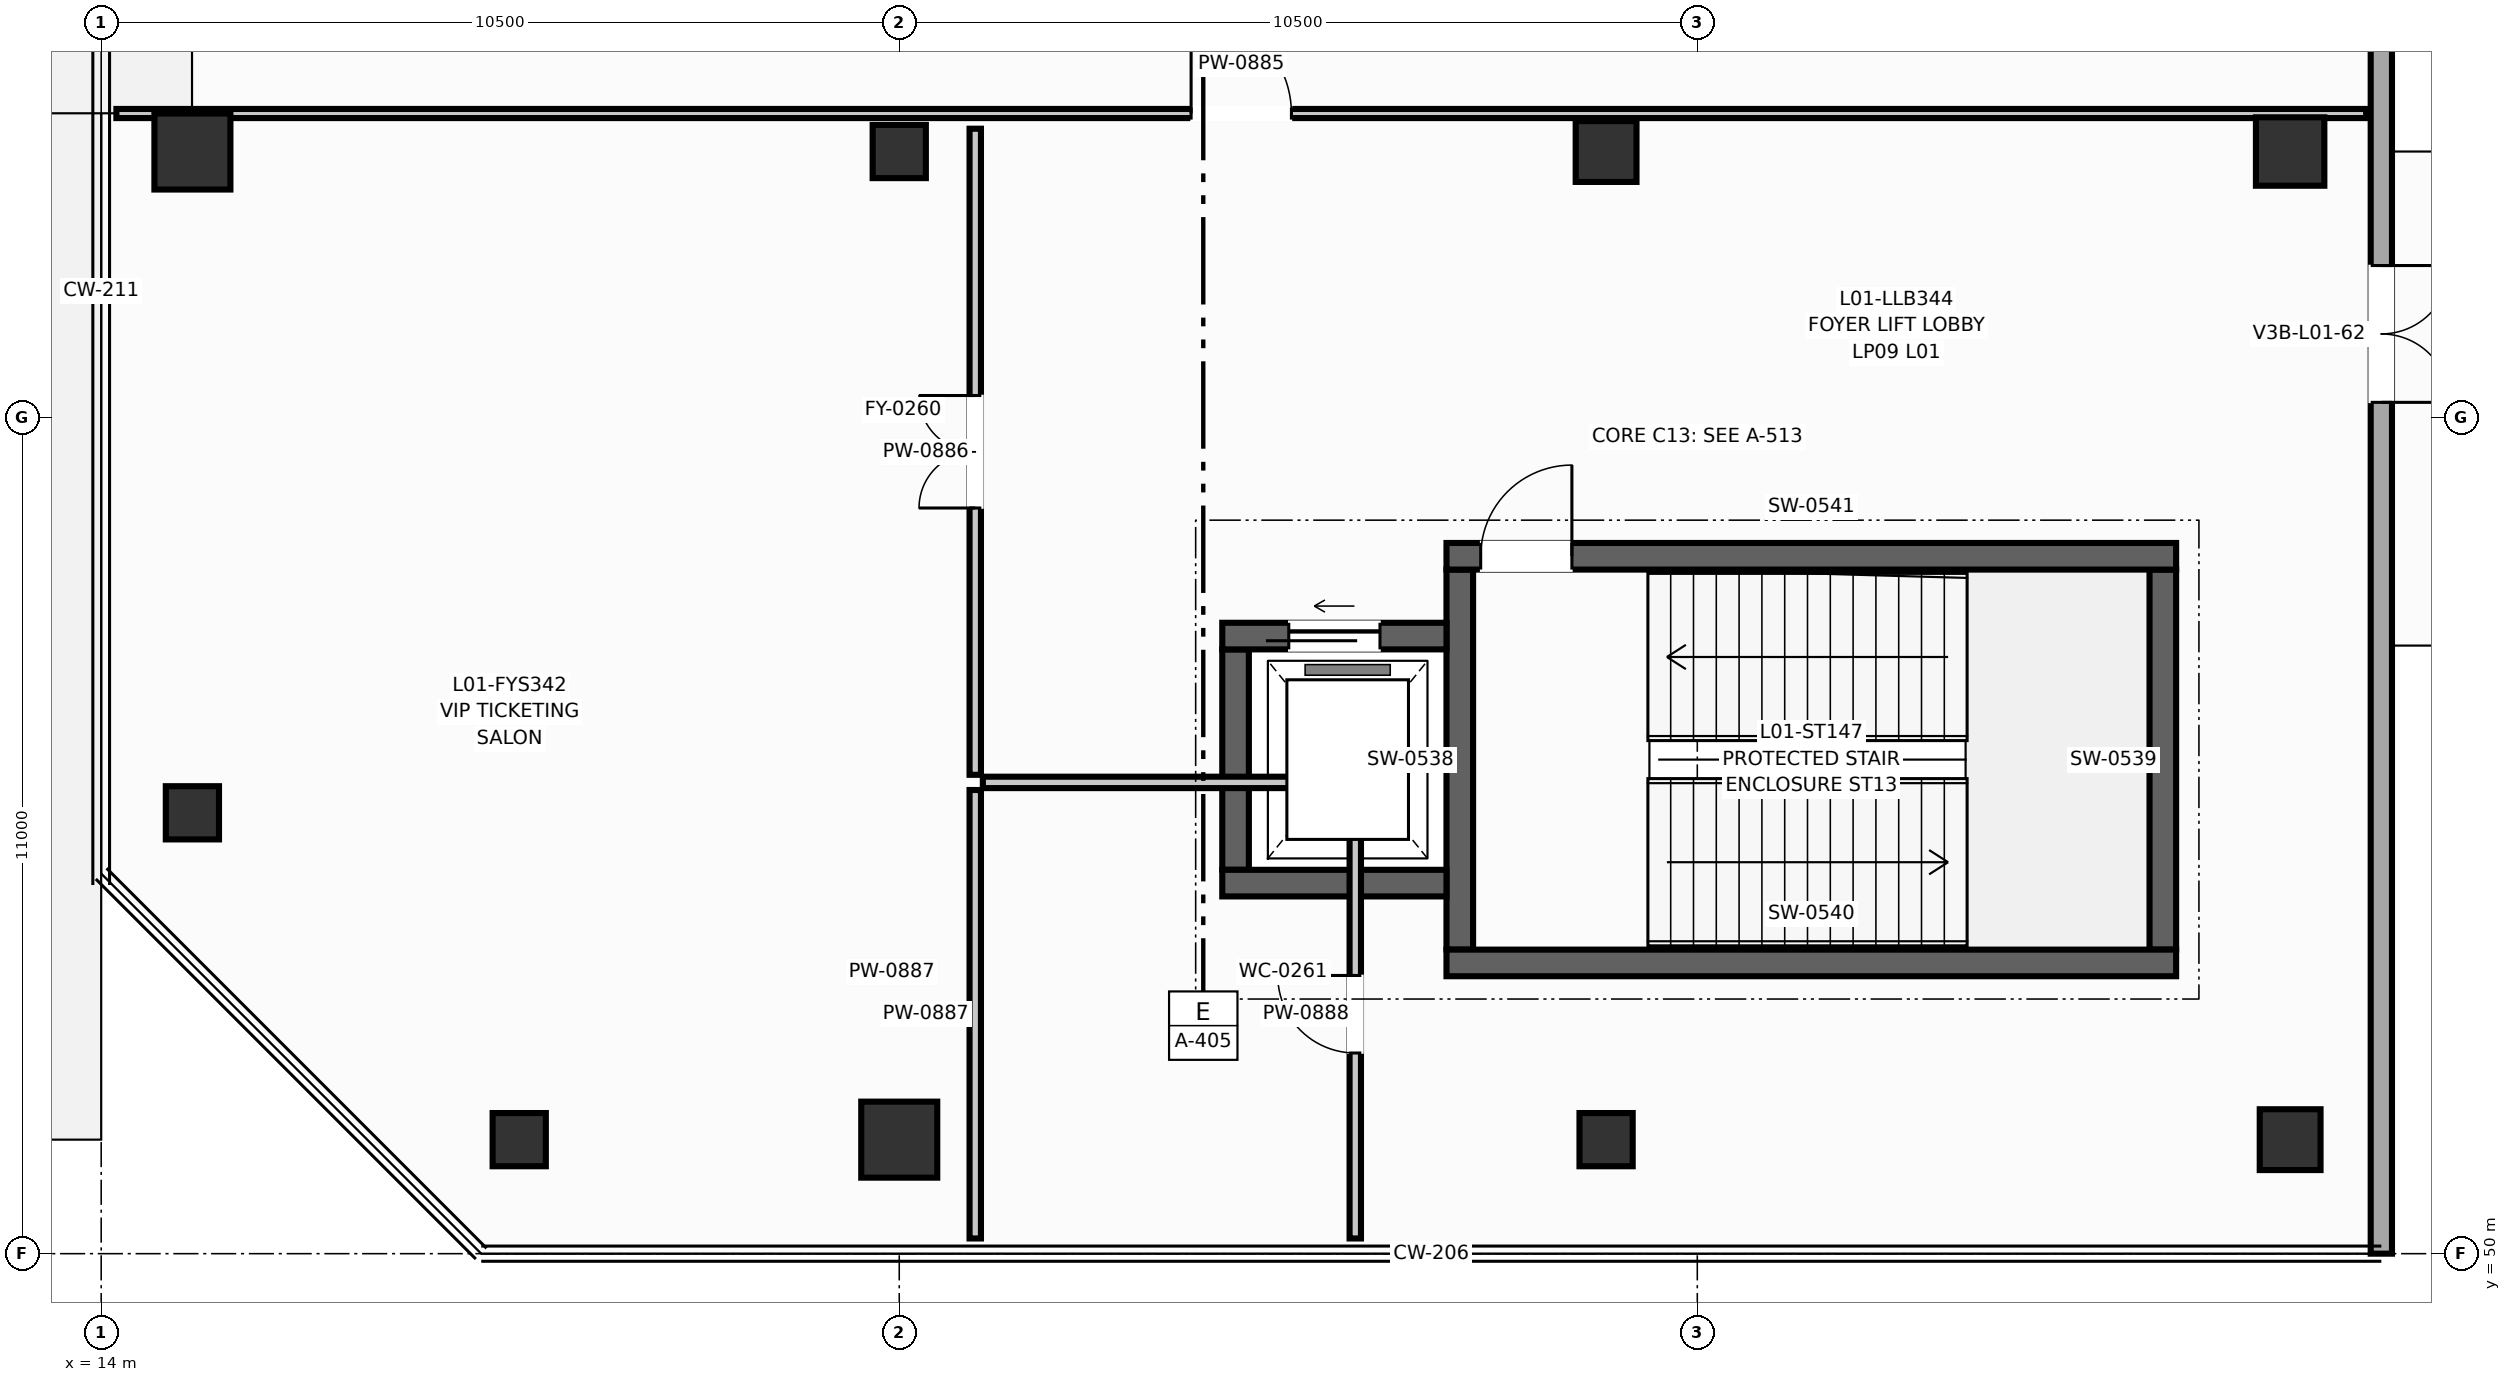
"""IFC4 building model, lengths in metres.
Left out: names, types, materials, properties, quantities, classifications, styles, units other than length and angle.
Written with IfcOpenShell. Run it as: python <this file> out.ifc"""

import sys

from ifc_helpers import new_model, si_unit, direction, frame, frame_2d, origin, origin_2d, place, context, subcontext, project, spatial, rectangle, circle, extrude, element, fill, save


model = new_model("IFC4")
c1 = context("Model", 3, precision=1e-05, world=origin(), true_north=direction((0.0, 1.0)))
c2 = subcontext(c1, "Body", "Model", "MODEL_VIEW")
j1 = project(units=[si_unit("LENGTHUNIT", "METRE"), si_unit("PLANEANGLEUNIT", "RADIAN")], contexts=[c1])
p1 = place(None, origin())
s1 = spatial("IfcSite", under=j1, at=p1, CompositionType="ELEMENT")
p2 = place(p1, origin())
s2 = spatial("IfcBuilding", under=s1, at=p2, CompositionType="ELEMENT")
p3 = place(p2, frame((0.0, 0.0, 4.5)))
s3 = spatial("IfcBuildingStorey", under=s2, at=p3, CompositionType="ELEMENT", Elevation=4.5)
for number, where, z_axis, x_axis in (
    (1, (15.2, 64.5, 0.0), (0.0, 0.0, 1.0), (1.0, 0.0, 0.0)),
    (2, (24.5, 51.5, 0.0), (0.0, 0.0, 1.0), (1.0, 0.0, 0.0)),
):
    element("IfcColumn", number, at=place(p3, frame(where, z_axis=z_axis, x_axis=x_axis)), inside=s3, PredefinedType="COLUMN", context=c2, shape_type="SweptSolid", body=[
        extrude(circle(Radius=0.5, at=origin_2d()), origin(), (0.0, 0.0, 1.0), 4.5),
    ])
for number, where, z_axis, x_axis in (
    (3, (24.5, 64.5, 0.0), (0.0, 0.0, 1.0), (1.0, 0.0, 0.0)),
    (4, (33.8, 51.5, 0.0), (0.0, 0.0, 1.0), (1.0, 0.0, 0.0)),
):
    element("IfcColumn", number, at=place(p3, frame(where, z_axis=z_axis, x_axis=x_axis)), inside=s3, PredefinedType="COLUMN", context=c2, shape_type="SweptSolid", body=[
        extrude(circle(Radius=0.35, at=origin_2d()), origin(), (0.0, 0.0, 1.0), 4.5),
    ])
for number, where, z_axis, x_axis in (
    (5, (33.8, 64.5, 0.0), (0.0, 0.0, 1.0), (1.0, 0.0, 0.0)),
    (6, (42.8, 51.5, 0.0), (0.0, 0.0, 1.0), (1.0, 0.0, 0.0)),
):
    element("IfcColumn", number, at=place(p3, frame(where, z_axis=z_axis, x_axis=x_axis)), inside=s3, PredefinedType="COLUMN", context=c2, shape_type="SweptSolid", body=[
        extrude(circle(Radius=0.4, at=origin_2d()), origin(), (0.0, 0.0, 1.0), 4.5),
    ])
p4 = place(p3, frame((42.8, 64.5, 0.0), z_axis=(0.0, 0.0, 1.0), x_axis=(1.0, 0.0, 0.0)))
e7 = element("IfcColumn", 7, at=p4, inside=s3, PredefinedType="COLUMN", context=c2, shape_type="SweptSolid", body=[
    extrude(circle(Radius=0.45, at=origin_2d()), origin(), (0.0, 0.0, 1.0), 4.5),
])
for number, where, z_axis, x_axis in (
    (8, (19.5, 51.5, 0.0), (0.0, 0.0, 1.0), (1.0, 0.0, 0.0)),
    (9, (15.2, 55.8, 0.0), (0.0, 0.0, 1.0), (1.0, 0.0, 0.0)),
):
    element("IfcColumn", number, at=place(p3, frame(where, z_axis=z_axis, x_axis=x_axis)), inside=s3, PredefinedType="COLUMN", context=c2, shape_type="SweptSolid", body=[
        extrude(circle(Radius=0.35, at=origin_2d()), origin(), (0.0, 0.0, 1.0), 4.5),
    ])
p5 = place(p3, frame((44.0, 50.0, 0.0), z_axis=(0.0, 0.0, 1.0), x_axis=(0.0, 1.0, 0.0)))
e10 = element("IfcWall", 10, at=p5, inside=s3, PredefinedType="SOLIDWALL", context=c2, shape_type="SweptSolid", body=[
    extrude(rectangle(XDim=56.0, YDim=0.28, at=frame_2d((28.0, 0.0))), origin(), (0.0, 0.0, 1.0), 3.55),
])
p6 = place(p5, frame((11.2, 0.0, 0.0)))
e11 = element("IfcOpeningElement", 11, at=p6, cuts=e10, PredefinedType="OPENING", context=c2, shape_type="SweptSolid", body=[
    extrude(rectangle(XDim=1.8, YDim=2.35, at=frame_2d((0.9, 1.175))), frame((0.0, 0.15, 0.0), z_axis=(0.0, -1.0, 0.0), x_axis=(1.0, 0.0, 0.0)), (0.0, 0.0, 1.0), 0.3),
])
p7 = place(p5, frame((43.0, 0.0, 0.0)))
e12 = element("IfcOpeningElement", 12, at=p7, cuts=e10, PredefinedType="OPENING", context=c2, shape_type="SweptSolid", body=[
    extrude(rectangle(XDim=1.8, YDim=2.35, at=frame_2d((0.9, 1.175))), frame((0.0, 0.15, 0.0), z_axis=(0.0, -1.0, 0.0), x_axis=(1.0, 0.0, 0.0)), (0.0, 0.0, 1.0), 0.3),
])
for number, where, z_axis, x_axis in (
    (13, (31.875, 54.0, 0.0), (0.0, 0.0, 1.0), (0.0, 1.0, 0.0)),
    (14, (41.125, 54.0, 0.0), (0.0, 0.0, 1.0), (0.0, 1.0, 0.0)),
):
    element("IfcWall", number, at=place(p3, frame(where, z_axis=z_axis, x_axis=x_axis)), inside=s3, PredefinedType="SHEAR", context=c2, shape_type="SweptSolid", body=[
        extrude(rectangle(XDim=5.0, YDim=0.35, at=frame_2d((2.5, 0.0))), origin(), (0.0, 0.0, 1.0), 4.29),
    ])
p8 = place(p3, frame((31.7, 53.825, 0.0), z_axis=(0.0, 0.0, 1.0), x_axis=(1.0, 0.0, 0.0)))
e15 = element("IfcWall", 15, at=p8, inside=s3, PredefinedType="SHEAR", context=c2, shape_type="SweptSolid", body=[
    extrude(rectangle(XDim=9.6, YDim=0.35, at=frame_2d((4.8, 0.0))), origin(), (0.0, 0.0, 1.0), 4.29),
])
p9 = place(p3, frame((31.7, 59.175, 0.0), z_axis=(0.0, 0.0, 1.0), x_axis=(1.0, 0.0, 0.0)))
e16 = element("IfcWall", 16, at=p9, inside=s3, PredefinedType="SHEAR", context=c2, shape_type="SweptSolid", body=[
    extrude(rectangle(XDim=9.6, YDim=0.35, at=frame_2d((4.8, 0.0))), origin(), (0.0, 0.0, 1.0), 4.29),
])
p10 = place(p9, frame((0.45, 0.0, 0.0)))
e17 = element("IfcOpeningElement", 17, at=p10, cuts=e16, PredefinedType="OPENING", context=c2, shape_type="SweptSolid", body=[
    extrude(rectangle(XDim=1.2, YDim=2.2, at=frame_2d((0.6, 1.1))), frame((0.0, 0.185, 0.0), z_axis=(0.0, -1.0, 0.0), x_axis=(1.0, 0.0, 0.0)), (0.0, 0.0, 1.0), 0.37),
])
p11 = place(p3, frame((28.925, 55.05, 0.0), z_axis=(0.0, 0.0, 1.0), x_axis=(0.0, 1.0, 0.0)))
e18 = element("IfcWall", 18, at=p11, inside=s3, PredefinedType="SHEAR", context=c2, shape_type="SweptSolid", body=[
    extrude(rectangle(XDim=2.9, YDim=0.35, at=frame_2d((1.45, 0.0))), origin(), (0.0, 0.0, 1.0), 4.29),
])
p12 = place(p3, frame((28.75, 54.875, 0.0), z_axis=(0.0, 0.0, 1.0), x_axis=(1.0, 0.0, 0.0)))
e19 = element("IfcWall", 19, at=p12, inside=s3, PredefinedType="SHEAR", context=c2, shape_type="SweptSolid", body=[
    extrude(rectangle(XDim=2.95, YDim=0.35, at=frame_2d((1.475, 0.0))), origin(), (0.0, 0.0, 1.0), 4.29),
])
p13 = place(p3, frame((28.75, 58.125, 0.0), z_axis=(0.0, 0.0, 1.0), x_axis=(1.0, 0.0, 0.0)))
e20 = element("IfcWall", 20, at=p13, inside=s3, PredefinedType="SHEAR", context=c2, shape_type="SweptSolid", body=[
    extrude(rectangle(XDim=2.95, YDim=0.35, at=frame_2d((1.475, 0.0))), origin(), (0.0, 0.0, 1.0), 4.29),
])
p14 = place(p13, frame((0.875, 0.0, 0.0)))
e21 = element("IfcOpeningElement", 21, at=p14, cuts=e20, PredefinedType="OPENING", context=c2, shape_type="SweptSolid", body=[
    extrude(rectangle(XDim=1.2, YDim=2.2, at=frame_2d((0.6, 1.1))), frame((0.0, 0.185, 0.0), z_axis=(0.0, -1.0, 0.0), x_axis=(1.0, 0.0, 0.0)), (0.0, 0.0, 1.0), 0.37),
])
p15 = place(p3, frame((14.2, 65.0, 0.0), z_axis=(0.0, 0.0, 1.0), x_axis=(1.0, 0.0, 0.0)))
e22 = element("IfcWall", 22, at=p15, inside=s3, PredefinedType="PARTITIONING", context=c2, shape_type="SweptSolid", body=[
    extrude(rectangle(XDim=29.6, YDim=0.12, at=frame_2d((14.8, 0.0))), origin(), (0.0, 0.0, 1.0), 3.22),
])
p16 = place(p15, frame((14.14, 0.0, 0.0)))
e23 = element("IfcOpeningElement", 23, at=p16, cuts=e22, PredefinedType="OPENING", context=c2, shape_type="SweptSolid", body=[
    extrude(rectangle(XDim=1.32, YDim=2.22, at=frame_2d((0.66, 1.11))), frame((0.0, 0.07, 0.0), z_axis=(0.0, -1.0, 0.0), x_axis=(1.0, 0.0, 0.0)), (0.0, 0.0, 1.0), 0.14),
])
p17 = place(p3, frame((25.5, 56.3, 0.0), z_axis=(0.0, 0.0, 1.0), x_axis=(0.0, 1.0, 0.0)))
e24 = element("IfcWall", 24, at=p17, inside=s3, PredefinedType="PARTITIONING", context=c2, shape_type="SweptSolid", body=[
    extrude(rectangle(XDim=8.5, YDim=0.15, at=frame_2d((4.25, 0.0))), origin(), (0.0, 0.0, 1.0), 3.22),
])
p18 = place(p17, frame((3.51, 0.0, 0.0)))
e25 = element("IfcOpeningElement", 25, at=p18, cuts=e24, PredefinedType="OPENING", context=c2, shape_type="SweptSolid", body=[
    extrude(rectangle(XDim=1.48, YDim=2.24, at=frame_2d((0.74, 1.12))), frame((0.0, 0.085, 0.0), z_axis=(0.0, -1.0, 0.0), x_axis=(1.0, 0.0, 0.0)), (0.0, 0.0, 1.0), 0.17),
])
p19 = place(p3, frame((25.5, 50.2, 0.0), z_axis=(0.0, 0.0, 1.0), x_axis=(0.0, 1.0, 0.0)))
e26 = element("IfcWall", 26, at=p19, inside=s3, PredefinedType="PARTITIONING", context=c2, shape_type="SweptSolid", body=[
    extrude(rectangle(XDim=5.9, YDim=0.15, at=frame_2d((2.95, 0.0))), origin(), (0.0, 0.0, 1.0), 3.22),
])
p20 = place(p3, frame((30.5, 50.2, 0.0), z_axis=(0.0, 0.0, 1.0), x_axis=(0.0, 1.0, 0.0)))
e27 = element("IfcWall", 27, at=p20, inside=s3, PredefinedType="PARTITIONING", context=c2, shape_type="SweptSolid", body=[
    extrude(rectangle(XDim=5.9, YDim=0.15, at=frame_2d((2.95, 0.0))), origin(), (0.0, 0.0, 1.0), 3.22),
])
p21 = place(p20, frame((2.44, 0.0, 0.0)))
e28 = element("IfcOpeningElement", 28, at=p21, cuts=e27, PredefinedType="OPENING", context=c2, shape_type="SweptSolid", body=[
    extrude(rectangle(XDim=1.02, YDim=2.15, at=frame_2d((0.51, 1.075))), frame((0.0, 0.085, 0.0), z_axis=(0.0, -1.0, 0.0), x_axis=(1.0, 0.0, 0.0)), (0.0, 0.0, 1.0), 0.17),
])
p22 = place(p3, frame((25.6, 56.2, 0.0), z_axis=(0.0, 0.0, 1.0), x_axis=(1.0, 0.0, 0.0)))
e29 = element("IfcWall", 29, at=p22, inside=s3, PredefinedType="PARTITIONING", context=c2, shape_type="SweptSolid", body=[
    extrude(rectangle(XDim=4.8, YDim=0.15, at=frame_2d((2.4, 0.0))), origin(), (0.0, 0.0, 1.0), 3.22),
])
p23 = place(p6, frame((1.8, 0.0, 0.0), z_axis=(0.0, 0.0, 1.0), x_axis=(-1.0, 0.0, 0.0)))
e30 = element("IfcDoor", 30, at=p23, inside=s3, OperationType="DOUBLE_DOOR_SINGLE_SWING", PredefinedType="DOOR", context=c2, shape_type="SweptSolid", body=[
    extrude(rectangle(XDim=1.8, YDim=2.35, at=frame_2d((0.9, 1.175))), frame((0.0, 0.025, 0.0), z_axis=(0.0, -1.0, 0.0), x_axis=(1.0, 0.0, 0.0)), (0.0, 0.0, 1.0), 0.05),
])
fill(e11, e30)
p24 = place(p10, origin())
e31 = element("IfcDoor", 31, at=p24, inside=s3, OperationType="SINGLE_SWING_RIGHT", PredefinedType="DOOR", context=c2, shape_type="SweptSolid", body=[
    extrude(rectangle(XDim=1.2, YDim=2.2, at=frame_2d((0.6, 1.1))), frame((0.0, 0.025, 0.0), z_axis=(0.0, -1.0, 0.0), x_axis=(1.0, 0.0, 0.0)), (0.0, 0.0, 1.0), 0.05),
])
fill(e17, e31)
p25 = place(p14, origin())
e32 = element("IfcDoor", 32, at=p25, inside=s3, OperationType="SLIDING_TO_LEFT", PredefinedType="DOOR", context=c2, shape_type="SweptSolid", body=[
    extrude(rectangle(XDim=1.2, YDim=2.2, at=frame_2d((0.6, 1.1))), frame((0.0, 0.025, 0.0), z_axis=(0.0, -1.0, 0.0), x_axis=(1.0, 0.0, 0.0)), (0.0, 0.0, 1.0), 0.05),
])
fill(e21, e32)
p26 = place(p16, origin())
e33 = element("IfcDoor", 33, at=p26, inside=s3, OperationType="SINGLE_SWING_LEFT", PredefinedType="DOOR", context=c2, shape_type="SweptSolid", body=[
    extrude(rectangle(XDim=1.32, YDim=2.22, at=frame_2d((0.66, 1.11))), frame((0.0, 0.025, 0.0), z_axis=(0.0, -1.0, 0.0), x_axis=(1.0, 0.0, 0.0)), (0.0, 0.0, 1.0), 0.05),
])
fill(e23, e33)
p27 = place(p18, origin())
e34 = element("IfcDoor", 34, at=p27, inside=s3, OperationType="DOUBLE_DOOR_SINGLE_SWING", PredefinedType="DOOR", context=c2, shape_type="SweptSolid", body=[
    extrude(rectangle(XDim=1.48, YDim=2.24, at=frame_2d((0.74, 1.12))), frame((0.0, 0.025, 0.0), z_axis=(0.0, -1.0, 0.0), x_axis=(1.0, 0.0, 0.0)), (0.0, 0.0, 1.0), 0.05),
])
fill(e25, e34)
p28 = place(p21, origin())
e35 = element("IfcDoor", 35, at=p28, inside=s3, OperationType="SINGLE_SWING_RIGHT", PredefinedType="DOOR", context=c2, shape_type="SweptSolid", body=[
    extrude(rectangle(XDim=1.02, YDim=2.15, at=frame_2d((0.51, 1.075))), frame((0.0, 0.025, 0.0), z_axis=(0.0, -1.0, 0.0), x_axis=(1.0, 0.0, 0.0)), (0.0, 0.0, 1.0), 0.05),
])
fill(e28, e35)
save(model, sys.argv[1])
